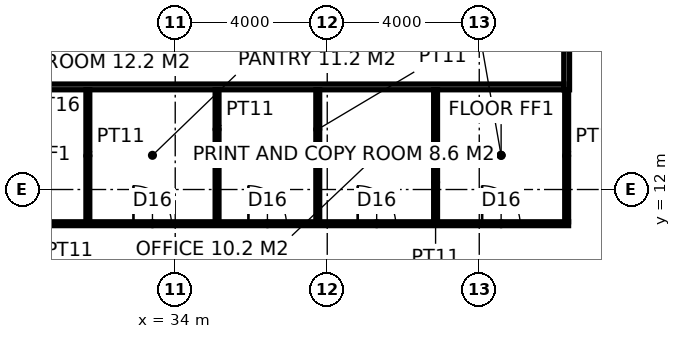
"""IFC4 building model, lengths in metres.
Left out: names, types, materials, properties, quantities, classifications, styles, units other than length and angle.
Written with IfcOpenShell. Run it as: python <this file> out.ifc"""

import sys

from ifc_helpers import new_model, si_unit, direction, frame, frame_2d, origin, place, context, subcontext, project, spatial, rectangle, extrude, element, fill, save


model = new_model("IFC4")
c1 = context("Model", 3, precision=1e-05, world=origin(), true_north=direction((0.0, 1.0)))
c2 = subcontext(c1, "Body", "Model", "MODEL_VIEW")
j1 = project(units=[si_unit("LENGTHUNIT", "METRE"), si_unit("PLANEANGLEUNIT", "RADIAN")], contexts=[c1])
p1 = place(None, origin())
s1 = spatial("IfcSite", under=j1, at=p1, CompositionType="ELEMENT")
p2 = place(p1, origin())
s2 = spatial("IfcBuilding", under=s1, at=p2, CompositionType="ELEMENT")
p3 = place(p2, frame((0.0, 0.0, 59.0)))
s3 = spatial("IfcBuildingStorey", under=s2, at=p3, CompositionType="ELEMENT", Elevation=59.0)
p4 = place(p3, frame((44.3, 14.625, 0.0), z_axis=(0.0, 0.0, 1.0), x_axis=(0.0, 1.0, 0.0)))
e1 = element("IfcWall", 1, at=p4, inside=s3, PredefinedType="PARTITIONING", context=c2, shape_type="SweptSolid", body=[
    extrude(rectangle(XDim=24.15, YDim=0.15, at=frame_2d((12.075, 0.0))), origin(), (0.0, 0.0, 1.0), 3.85),
])
p5 = place(p4, frame((2.825, 0.0, 0.0)))
e2 = element("IfcOpeningElement", 2, at=p5, cuts=e1, PredefinedType="OPENING", context=c2, shape_type="SweptSolid", body=[
    extrude(rectangle(XDim=1.8, YDim=2.4, at=frame_2d((0.9, 1.2))), frame((0.0, 0.085, 0.0), z_axis=(0.0, -1.0, 0.0), x_axis=(1.0, 0.0, 0.0)), (0.0, 0.0, 1.0), 0.17),
])
p6 = place(p4, frame((15.425, 0.0, 0.0)))
e3 = element("IfcOpeningElement", 3, at=p6, cuts=e1, PredefinedType="OPENING", context=c2, shape_type="SweptSolid", body=[
    extrude(rectangle(XDim=1.8, YDim=2.4, at=frame_2d((0.9, 1.2))), frame((0.0, 0.085, 0.0), z_axis=(0.0, -1.0, 0.0), x_axis=(1.0, 0.0, 0.0)), (0.0, 0.0, 1.0), 0.17),
])
p7 = place(p3, frame((15.775, 14.7, 0.0), z_axis=(0.0, 0.0, 1.0), x_axis=(1.0, 0.0, 0.0)))
e4 = element("IfcWall", 4, at=p7, inside=s3, PredefinedType="PARTITIONING", context=c2, shape_type="SweptSolid", body=[
    extrude(rectangle(XDim=28.45, YDim=0.15, at=frame_2d((14.225, 0.0))), origin(), (0.0, 0.0, 1.0), 3.85),
])
p8 = place(p3, frame((28.061, 11.1, 0.0), z_axis=(0.0, 0.0, 1.0), x_axis=(1.0, 0.0, 0.0)))
e5 = element("IfcWall", 5, at=p8, inside=s3, PredefinedType="PARTITIONING", context=c2, shape_type="SweptSolid", body=[
    extrude(rectangle(XDim=16.289, YDim=0.1, at=frame_2d((8.145, 0.0))), origin(), (0.0, 0.0, 1.0), 3.85),
])
p9 = place(p8, frame((1.29, 0.0, 0.0)))
e6 = element("IfcOpeningElement", 6, at=p9, cuts=e5, PredefinedType="OPENING", context=c2, shape_type="SweptSolid", body=[
    extrude(rectangle(XDim=1.0, YDim=2.2, at=frame_2d((0.5, 1.1))), frame((0.0, 0.06, 0.0), z_axis=(0.0, -1.0, 0.0), x_axis=(1.0, 0.0, 0.0)), (0.0, 0.0, 1.0), 0.12),
])
p10 = place(p8, frame((4.84, 0.0, 0.0)))
e7 = element("IfcOpeningElement", 7, at=p10, cuts=e5, PredefinedType="OPENING", context=c2, shape_type="SweptSolid", body=[
    extrude(rectangle(XDim=1.0, YDim=2.2, at=frame_2d((0.5, 1.1))), frame((0.0, 0.06, 0.0), z_axis=(0.0, -1.0, 0.0), x_axis=(1.0, 0.0, 0.0)), (0.0, 0.0, 1.0), 0.12),
])
p11 = place(p8, frame((7.865, 0.0, 0.0)))
e8 = element("IfcOpeningElement", 8, at=p11, cuts=e5, PredefinedType="OPENING", context=c2, shape_type="SweptSolid", body=[
    extrude(rectangle(XDim=1.0, YDim=2.2, at=frame_2d((0.5, 1.1))), frame((0.0, 0.06, 0.0), z_axis=(0.0, -1.0, 0.0), x_axis=(1.0, 0.0, 0.0)), (0.0, 0.0, 1.0), 0.12),
])
p12 = place(p8, frame((10.74, 0.0, 0.0)))
e9 = element("IfcOpeningElement", 9, at=p12, cuts=e5, PredefinedType="OPENING", context=c2, shape_type="SweptSolid", body=[
    extrude(rectangle(XDim=1.0, YDim=2.2, at=frame_2d((0.5, 1.1))), frame((0.0, 0.06, 0.0), z_axis=(0.0, -1.0, 0.0), x_axis=(1.0, 0.0, 0.0)), (0.0, 0.0, 1.0), 0.12),
])
p13 = place(p8, frame((14.014, 0.0, 0.0)))
e10 = element("IfcOpeningElement", 10, at=p13, cuts=e5, PredefinedType="OPENING", context=c2, shape_type="SweptSolid", body=[
    extrude(rectangle(XDim=1.0, YDim=2.2, at=frame_2d((0.5, 1.1))), frame((0.0, 0.06, 0.0), z_axis=(0.0, -1.0, 0.0), x_axis=(1.0, 0.0, 0.0)), (0.0, 0.0, 1.0), 0.12),
])
for number, where, z_axis, x_axis in (
    (11, (31.701, 11.15, 0.0), (0.0, 0.0, 1.0), (0.0, 1.0, 0.0)),
    (12, (35.101, 11.15, 0.0), (0.0, 0.0, 1.0), (0.0, 1.0, 0.0)),
    (13, (37.751, 11.15, 0.0), (0.0, 0.0, 1.0), (0.0, 1.0, 0.0)),
    (14, (40.851, 11.15, 0.0), (0.0, 0.0, 1.0), (0.0, 1.0, 0.0)),
    (15, (44.3, 11.15, 0.0), (0.0, 0.0, 1.0), (0.0, 1.0, 0.0)),
):
    element("IfcWall", number, at=place(p3, frame(where, z_axis=z_axis, x_axis=x_axis)), inside=s3, PredefinedType="PARTITIONING", context=c2, shape_type="SweptSolid", body=[
        extrude(rectangle(XDim=3.475, YDim=0.1, at=frame_2d((1.738, 0.0))), origin(), (0.0, 0.0, 1.0), 3.85),
    ])
p14 = place(p10, origin())
e16 = element("IfcDoor", 16, at=p14, inside=s3, OperationType="SINGLE_SWING_LEFT", PredefinedType="DOOR", context=c2, shape_type="SweptSolid", body=[
    extrude(rectangle(XDim=1.0, YDim=2.2, at=frame_2d((0.5, 1.1))), frame((0.0, 0.025, 0.0), z_axis=(0.0, -1.0, 0.0), x_axis=(1.0, 0.0, 0.0)), (0.0, 0.0, 1.0), 0.05),
])
fill(e7, e16)
p15 = place(p11, origin())
e17 = element("IfcDoor", 17, at=p15, inside=s3, OperationType="SINGLE_SWING_LEFT", PredefinedType="DOOR", context=c2, shape_type="SweptSolid", body=[
    extrude(rectangle(XDim=1.0, YDim=2.2, at=frame_2d((0.5, 1.1))), frame((0.0, 0.025, 0.0), z_axis=(0.0, -1.0, 0.0), x_axis=(1.0, 0.0, 0.0)), (0.0, 0.0, 1.0), 0.05),
])
fill(e8, e17)
p16 = place(p12, origin())
e18 = element("IfcDoor", 18, at=p16, inside=s3, OperationType="SINGLE_SWING_LEFT", PredefinedType="DOOR", context=c2, shape_type="SweptSolid", body=[
    extrude(rectangle(XDim=1.0, YDim=2.2, at=frame_2d((0.5, 1.1))), frame((0.0, 0.025, 0.0), z_axis=(0.0, -1.0, 0.0), x_axis=(1.0, 0.0, 0.0)), (0.0, 0.0, 1.0), 0.05),
])
fill(e9, e18)
p17 = place(p13, origin())
e19 = element("IfcDoor", 19, at=p17, inside=s3, OperationType="SINGLE_SWING_LEFT", PredefinedType="DOOR", context=c2, shape_type="SweptSolid", body=[
    extrude(rectangle(XDim=1.0, YDim=2.2, at=frame_2d((0.5, 1.1))), frame((0.0, 0.025, 0.0), z_axis=(0.0, -1.0, 0.0), x_axis=(1.0, 0.0, 0.0)), (0.0, 0.0, 1.0), 0.05),
])
fill(e10, e19)
save(model, sys.argv[1])
